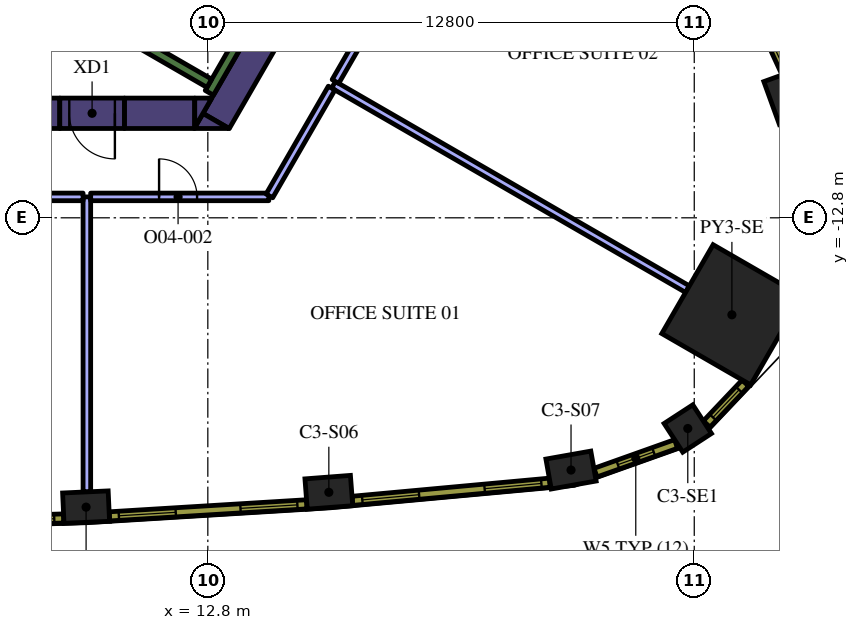
"""IFC4 building model, lengths in metres.
Left out: names, types, materials, properties, quantities, classifications, styles, units other than length and angle.
Written with IfcOpenShell. Run it as: python <this file> out.ifc"""

import sys

from ifc_helpers import new_model, si_unit, direction, frame, frame_2d, origin, origin_2d, place, context, subcontext, project, spatial, polyline, rectangle, outline, extrude, element, fill, save


model = new_model("IFC4")
c1 = context("Model", 3, precision=1e-05, world=origin(), true_north=direction((0.0, 1.0)))
c2 = subcontext(c1, "Body", "Model", "MODEL_VIEW")
j1 = project(units=[si_unit("LENGTHUNIT", "METRE"), si_unit("PLANEANGLEUNIT", "RADIAN")], contexts=[c1])
p1 = place(None, origin())
s1 = spatial("IfcSite", under=j1, at=p1, CompositionType="ELEMENT")
p2 = place(p1, origin())
s2 = spatial("IfcBuilding", under=s1, at=p2, CompositionType="ELEMENT")
p3 = place(p2, frame((0.0, 0.0, 187.8)))
s3 = spatial("IfcBuildingStorey", under=s2, at=p3, CompositionType="ELEMENT", Elevation=187.8)
p4 = place(p3, frame((26.591, -15.352, 0.0), z_axis=(0.0, 0.0, 1.0), x_axis=(0.866025403784, -0.5, 0.0)))
e1 = element("IfcColumn", 1, at=p4, inside=s3, PredefinedType="COLUMN", context=c2, shape_type="SweptSolid", body=[
    extrude(rectangle(XDim=2.7, YDim=2.7, at=origin_2d()), origin(), (0.0, 0.0, 1.0), 4.2),
])
for number, where, z_axis, x_axis in (
    (2, (9.597, -20.413, 0.0), (0.0, 0.0, 1.0), (0.999, 0.046, 0.0)),
    (3, (15.985, -20.022, 0.0), (0.0, 0.0, 1.0), (0.997, 0.076, 0.0)),
    (4, (22.357, -19.437, 0.0), (0.0, 0.0, 1.0), (0.985, 0.175, 0.0)),
):
    element("IfcColumn", number, at=place(p3, frame(where, z_axis=z_axis, x_axis=x_axis)), inside=s3, PredefinedType="COLUMN", context=c2, shape_type="SweptSolid", body=[
        extrude(rectangle(XDim=1.2, YDim=0.8, at=origin_2d()), origin(), (0.0, 0.0, 1.0), 4.2),
    ])
p5 = place(p3, frame((25.43, -18.344, 0.0), z_axis=(0.0, 0.0, 1.0), x_axis=(0.838094050847, 0.545525766518, 0.0)))
e5 = element("IfcColumn", 5, at=p5, inside=s3, PredefinedType="COLUMN", context=c2, shape_type="SweptSolid", body=[
    extrude(rectangle(XDim=0.9, YDim=0.9, at=origin_2d()), origin(), (0.0, 0.0, 1.0), 4.2),
])
p6 = place(p3, frame((28.012, -9.644, 0.0), z_axis=(0.0, 0.0, 1.0), x_axis=(-0.340743851601, 0.940156171918, 0.0)))
e6 = element("IfcColumn", 6, at=p6, inside=s3, PredefinedType="COLUMN", context=c2, shape_type="SweptSolid", body=[
    extrude(rectangle(XDim=1.2, YDim=0.8, at=origin_2d()), origin(), (0.0, 0.0, 1.0), 4.2),
])
p7 = place(p3, frame((13.018, -10.252, 0.0), z_axis=(0.0, 0.0, 1.0), x_axis=(0.499984020225, 0.866034629516, 0.0)))
e7 = element("IfcWall", 7, at=p7, inside=s3, PredefinedType="SOLIDWALL", context=c2, shape_type="SweptSolid", body=[
    extrude(rectangle(XDim=3.824, YDim=0.8, at=frame_2d((1.912, 0.0))), origin(), (0.0, 0.0, 1.0), 4.2),
])
p8 = place(p3, origin())
e8 = element("IfcWall", 8, at=p8, inside=s3, PredefinedType="SOLIDWALL", context=c2, shape_type="SweptSolid", body=[
    extrude(outline(polyline([(12.671, -10.053), (13.358, -10.45), (12.442, -10.45), (12.671, -10.053)])), origin(), (0.0, 0.0, 1.0), 4.2),
])
p9 = place(p3, frame((10.604, -10.05, 0.0), z_axis=(0.0, 0.0, 1.0), x_axis=(1.0, 0.0, 0.0)))
e9 = element("IfcWall", 9, at=p9, inside=s3, PredefinedType="SOLIDWALL", context=c2, shape_type="SweptSolid", body=[
    extrude(rectangle(XDim=1.849, YDim=0.8, at=frame_2d((0.925, 0.0))), origin(), (0.0, 0.0, 1.0), 4.2),
])
e10 = element("IfcWall", 10, at=p8, inside=s3, PredefinedType="SOLIDWALL", context=c2, shape_type="SweptSolid", body=[
    extrude(outline(polyline([(12.904, -9.65), (12.456, -10.426), (12.456, -9.65), (12.904, -9.65)])), origin(), (0.0, 0.0, 1.0), 4.2),
])
p10 = place(p3, frame((-13.378, -10.05, 0.0), z_axis=(0.0, 0.0, 1.0), x_axis=(1.0, 0.0, 0.0)))
e11 = element("IfcWall", 11, at=p10, inside=s3, PredefinedType="SOLIDWALL", context=c2, shape_type="SweptSolid", body=[
    extrude(rectangle(XDim=22.282, YDim=0.8, at=frame_2d((11.141, 0.0))), origin(), (0.0, 0.0, 1.0), 4.2),
])
p11 = place(p3, frame((12.84, -9.511, 0.0), z_axis=(0.0, 0.0, 1.0), x_axis=(0.499997733992, 0.866026712061, 0.0)))
e12 = element("IfcWall", 12, at=p11, inside=s3, PredefinedType="SOLIDWALL", context=c2, shape_type="SweptSolid", body=[
    extrude(rectangle(XDim=3.634, YDim=0.25, at=frame_2d((1.817, 0.0))), origin(), (0.0, 0.0, 1.0), 4.2),
])
p12 = place(p3, frame((12.84, -9.261, 0.0), z_axis=(0.0, 0.0, 1.0), x_axis=(-0.866013990052, 0.500019768644, 0.0)))
e13 = element("IfcWall", 13, at=p12, inside=s3, PredefinedType="SOLIDWALL", context=c2, shape_type="SweptSolid", body=[
    extrude(rectangle(XDim=6.8, YDim=0.25, at=frame_2d((3.4, 0.0))), origin(), (0.0, 0.0, 1.0), 4.2),
])
p13 = place(p3, frame((10.604, -10.05, 0.0), z_axis=(0.0, 0.0, 1.0), x_axis=(-1.0, 0.0, 0.0)))
e14 = element("IfcWall", 14, at=p13, inside=s3, PredefinedType="SOLIDWALL", context=c2, shape_type="SweptSolid", body=[
    extrude(rectangle(XDim=1.7, YDim=0.8, at=frame_2d((0.85, 0.0))), origin(), (0.0, 0.0, 1.0), 4.2),
])
p14 = place(p13, frame((0.25, 0.0, 0.0)))
e15 = element("IfcOpeningElement", 15, at=p14, cuts=e14, PredefinedType="OPENING", context=c2, shape_type="SweptSolid", body=[
    extrude(rectangle(XDim=1.2, YDim=2.1, at=frame_2d((0.6, 1.05))), frame((0.0, 0.41, 0.0), z_axis=(0.0, -1.0, 0.0), x_axis=(1.0, 0.0, 0.0)), (0.0, 0.0, 1.0), 0.82),
])
p15 = place(p3, frame((9.617, -12.25, 0.0), z_axis=(0.0, 0.0, 1.0), x_axis=(0.0, -1.0, 0.0)))
e16 = element("IfcWall", 16, at=p15, inside=s3, PredefinedType="PARTITIONING", context=c2, shape_type="SweptSolid", body=[
    extrude(rectangle(XDim=7.761, YDim=0.2, at=frame_2d((3.881, 0.0))), origin(), (0.0, 0.0, 1.0), 3.15),
])
p16 = place(p3, frame((3.53, -12.25, 0.0), z_axis=(0.0, 0.0, 1.0), x_axis=(1.0, 0.0, 0.0)))
e17 = element("IfcWall", 17, at=p16, inside=s3, PredefinedType="PARTITIONING", context=c2, shape_type="SweptSolid", body=[
    extrude(rectangle(XDim=5.987, YDim=0.2, at=frame_2d((2.994, 0.0))), origin(), (0.0, 0.0, 1.0), 3.15),
])
p17 = place(p3, frame((16.108, -9.3, 0.0), z_axis=(0.0, 0.0, 1.0), x_axis=(0.866027180319, -0.499996922939, 0.0)))
e18 = element("IfcWall", 18, at=p17, inside=s3, PredefinedType="PARTITIONING", context=c2, shape_type="SweptSolid", body=[
    extrude(rectangle(XDim=10.754, YDim=0.2, at=frame_2d((5.377, 0.0))), origin(), (0.0, 0.0, 1.0), 3.15),
])
p18 = place(p3, frame((9.717, -12.25, 0.0), z_axis=(0.0, 0.0, 1.0), x_axis=(1.0, 0.0, 0.0)))
e19 = element("IfcWall", 19, at=p18, inside=s3, PredefinedType="PARTITIONING", context=c2, shape_type="SweptSolid", body=[
    extrude(rectangle(XDim=4.688, YDim=0.2, at=frame_2d((2.344, 0.0))), origin(), (0.0, 0.0, 1.0), 3.15),
])
p19 = place(p18, frame((1.8, 0.0, 0.0)))
e20 = element("IfcOpeningElement", 20, at=p19, cuts=e19, PredefinedType="OPENING", context=c2, shape_type="SweptSolid", body=[
    extrude(rectangle(XDim=1.0, YDim=2.1, at=frame_2d((0.5, 1.05))), frame((0.0, 0.11, 0.0), z_axis=(0.0, -1.0, 0.0), x_axis=(1.0, 0.0, 0.0)), (0.0, 0.0, 1.0), 0.22),
])
p20 = place(p3, frame((14.42, -12.224, 0.0), z_axis=(0.0, 0.0, 1.0), x_axis=(0.500001965626, 0.866024268927, 0.0)))
e21 = element("IfcWall", 21, at=p20, inside=s3, PredefinedType="PARTITIONING", context=c2, shape_type="SweptSolid", body=[
    extrude(rectangle(XDim=3.276, YDim=0.2, at=frame_2d((1.638, 0.0))), origin(), (0.0, 0.0, 1.0), 3.15),
])
p21 = place(p3, frame((16.158, -9.213, 0.0), z_axis=(0.0, 0.0, 1.0), x_axis=(0.499990919662, 0.866030646256, 0.0)))
e22 = element("IfcWall", 22, at=p21, inside=s3, PredefinedType="PARTITIONING", context=c2, shape_type="SweptSolid", body=[
    extrude(rectangle(XDim=3.306, YDim=0.2, at=frame_2d((1.653, 0.0))), origin(), (0.0, 0.0, 1.0), 3.15),
])
p22 = place(p3, frame((3.806, -20.87, 0.0), z_axis=(0.0, 0.0, 1.0), x_axis=(0.999533441983, 0.030543384845, 0.0)))
e23 = element("IfcWall", 23, at=p22, inside=s3, PredefinedType="SOLIDWALL", context=c2, shape_type="SweptSolid", body=[
    extrude(rectangle(XDim=5.204, YDim=0.24, at=frame_2d((2.602, 0.0))), origin(), (0.0, 0.0, 1.0), 3.95),
])
p23 = place(p22, frame((0.248, 0.0, 0.9)))
e24 = element("IfcOpeningElement", 24, at=p23, cuts=e23, PredefinedType="OPENING", context=c2, shape_type="SweptSolid", body=[
    extrude(rectangle(XDim=1.5, YDim=2.55, at=frame_2d((0.75, 1.275))), frame((0.0, 0.13, 0.0), z_axis=(0.0, -1.0, 0.0), x_axis=(1.0, 0.0, 0.0)), (0.0, 0.0, 1.0), 0.26),
])
p24 = place(p22, frame((3.455, 0.0, 0.9)))
e25 = element("IfcOpeningElement", 25, at=p24, cuts=e23, PredefinedType="OPENING", context=c2, shape_type="SweptSolid", body=[
    extrude(rectangle(XDim=1.5, YDim=2.55, at=frame_2d((0.75, 1.275))), frame((0.0, 0.13, 0.0), z_axis=(0.0, -1.0, 0.0), x_axis=(1.0, 0.0, 0.0)), (0.0, 0.0, 1.0), 0.26),
])
p25 = place(p3, frame((10.211, -20.656, 0.0), z_axis=(0.0, 0.0, 1.0), x_axis=(0.998135294646, 0.061040425794, 0.0)))
e26 = element("IfcWall", 26, at=p25, inside=s3, PredefinedType="SOLIDWALL", context=c2, shape_type="SweptSolid", body=[
    extrude(rectangle(XDim=5.204, YDim=0.24, at=frame_2d((2.602, 0.0))), origin(), (0.0, 0.0, 1.0), 3.95),
])
p26 = place(p25, frame((0.248, 0.0, 0.9)))
e27 = element("IfcOpeningElement", 27, at=p26, cuts=e26, PredefinedType="OPENING", context=c2, shape_type="SweptSolid", body=[
    extrude(rectangle(XDim=1.5, YDim=2.55, at=frame_2d((0.75, 1.275))), frame((0.0, 0.13, 0.0), z_axis=(0.0, -1.0, 0.0), x_axis=(1.0, 0.0, 0.0)), (0.0, 0.0, 1.0), 0.26),
])
p27 = place(p25, frame((3.455, 0.0, 0.9)))
e28 = element("IfcOpeningElement", 28, at=p27, cuts=e26, PredefinedType="OPENING", context=c2, shape_type="SweptSolid", body=[
    extrude(rectangle(XDim=1.5, YDim=2.55, at=frame_2d((0.75, 1.275))), frame((0.0, 0.13, 0.0), z_axis=(0.0, -1.0, 0.0), x_axis=(1.0, 0.0, 0.0)), (0.0, 0.0, 1.0), 0.26),
])
p28 = place(p3, frame((16.606, -20.247, 0.0), z_axis=(0.0, 0.0, 1.0), x_axis=(0.995808712151, 0.091460422067, 0.0)))
e29 = element("IfcWall", 29, at=p28, inside=s3, PredefinedType="SOLIDWALL", context=c2, shape_type="SweptSolid", body=[
    extrude(rectangle(XDim=5.213, YDim=0.24, at=frame_2d((2.606, 0.0))), origin(), (0.0, 0.0, 1.0), 3.95),
])
p29 = place(p28, frame((0.261, 0.0, 0.9)))
e30 = element("IfcOpeningElement", 30, at=p29, cuts=e29, PredefinedType="OPENING", context=c2, shape_type="SweptSolid", body=[
    extrude(rectangle(XDim=1.5, YDim=2.55, at=frame_2d((0.75, 1.275))), frame((0.0, 0.13, 0.0), z_axis=(0.0, -1.0, 0.0), x_axis=(1.0, 0.0, 0.0)), (0.0, 0.0, 1.0), 0.26),
])
p30 = place(p28, frame((3.492, 0.0, 0.9)))
e31 = element("IfcOpeningElement", 31, at=p30, cuts=e29, PredefinedType="OPENING", context=c2, shape_type="SweptSolid", body=[
    extrude(rectangle(XDim=1.5, YDim=2.55, at=frame_2d((0.75, 1.275))), frame((0.0, 0.13, 0.0), z_axis=(0.0, -1.0, 0.0), x_axis=(1.0, 0.0, 0.0)), (0.0, 0.0, 1.0), 0.26),
])
p31 = place(p3, frame((23.001, -19.505, 0.0), z_axis=(0.0, 0.0, 1.0), x_axis=(0.942099727267, 0.335332825539, 0.0)))
e32 = element("IfcWall", 32, at=p31, inside=s3, PredefinedType="SOLIDWALL", context=c2, shape_type="SweptSolid", body=[
    extrude(rectangle(XDim=2.25, YDim=0.24, at=frame_2d((1.125, 0.0))), origin(), (0.0, 0.0, 1.0), 3.95),
])
p32 = place(p31, frame((0.625, 0.0, 0.9)))
e33 = element("IfcOpeningElement", 33, at=p32, cuts=e32, PredefinedType="OPENING", context=c2, shape_type="SweptSolid", body=[
    extrude(rectangle(XDim=1.0, YDim=2.55, at=frame_2d((0.5, 1.275))), frame((0.0, 0.13, 0.0), z_axis=(0.0, -1.0, 0.0), x_axis=(1.0, 0.0, 0.0)), (0.0, 0.0, 1.0), 0.26),
])
p33 = place(p3, frame((25.927, -18.226, 0.0), z_axis=(0.0, 0.0, 1.0), x_axis=(0.687986858937, 0.725723144133, 0.0)))
e34 = element("IfcWall", 34, at=p33, inside=s3, PredefinedType="SOLIDWALL", context=c2, shape_type="SweptSolid", body=[
    extrude(rectangle(XDim=1.481, YDim=0.24, at=frame_2d((0.741, 0.0))), origin(), (0.0, 0.0, 1.0), 3.95),
])
p34 = place(p33, frame((0.241, 0.0, 0.9)))
e35 = element("IfcOpeningElement", 35, at=p34, cuts=e34, PredefinedType="OPENING", context=c2, shape_type="SweptSolid", body=[
    extrude(rectangle(XDim=1.0, YDim=2.55, at=frame_2d((0.5, 1.275))), frame((0.0, 0.13, 0.0), z_axis=(0.0, -1.0, 0.0), x_axis=(1.0, 0.0, 0.0)), (0.0, 0.0, 1.0), 0.26),
])
p35 = place(p3, frame((28.02, -8.992, 0.0), z_axis=(0.0, 0.0, 1.0), x_axis=(-0.418722559465, 0.908114209885, 0.0)))
e36 = element("IfcWall", 36, at=p35, inside=s3, PredefinedType="SOLIDWALL", context=c2, shape_type="SweptSolid", body=[
    extrude(rectangle(XDim=5.213, YDim=0.24, at=frame_2d((2.606, 0.0))), origin(), (0.0, 0.0, 1.0), 3.95),
])
p36 = place(p35, frame((0.221, 0.0, 0.9)))
e37 = element("IfcOpeningElement", 37, at=p36, cuts=e36, PredefinedType="OPENING", context=c2, shape_type="SweptSolid", body=[
    extrude(rectangle(XDim=1.5, YDim=2.55, at=frame_2d((0.75, 1.275))), frame((0.0, 0.13, 0.0), z_axis=(0.0, -1.0, 0.0), x_axis=(1.0, 0.0, 0.0)), (0.0, 0.0, 1.0), 0.26),
])
p37 = place(p35, frame((3.452, 0.0, 0.9)))
e38 = element("IfcOpeningElement", 38, at=p37, cuts=e36, PredefinedType="OPENING", context=c2, shape_type="SweptSolid", body=[
    extrude(rectangle(XDim=1.5, YDim=2.55, at=frame_2d((0.75, 1.275))), frame((0.0, 0.13, 0.0), z_axis=(0.0, -1.0, 0.0), x_axis=(1.0, 0.0, 0.0)), (0.0, 0.0, 1.0), 0.26),
])
p38 = place(p14, origin())
e39 = element("IfcDoor", 39, at=p38, inside=s3, OperationType="SINGLE_SWING_LEFT", PredefinedType="DOOR", context=c2, shape_type="SweptSolid", body=[
    extrude(rectangle(XDim=1.2, YDim=2.1, at=frame_2d((0.6, 1.05))), frame((0.0, 0.025, 0.0), z_axis=(0.0, -1.0, 0.0), x_axis=(1.0, 0.0, 0.0)), (0.0, 0.0, 1.0), 0.05),
])
fill(e15, e39)
p39 = place(p19, origin())
e40 = element("IfcDoor", 40, at=p39, inside=s3, OperationType="SINGLE_SWING_LEFT", PredefinedType="DOOR", context=c2, shape_type="SweptSolid", body=[
    extrude(rectangle(XDim=1.0, YDim=2.1, at=frame_2d((0.5, 1.05))), frame((0.0, 0.025, 0.0), z_axis=(0.0, -1.0, 0.0), x_axis=(1.0, 0.0, 0.0)), (0.0, 0.0, 1.0), 0.05),
])
fill(e20, e40)
p40 = place(p24, origin())
e41 = element("IfcWindow", 41, at=p40, inside=s3, PartitioningType="SINGLE_PANEL", PredefinedType="WINDOW", context=c2, shape_type="SweptSolid", body=[
    extrude(rectangle(XDim=1.5, YDim=2.55, at=frame_2d((0.75, 1.275))), frame((0.0, 0.04, 0.0), z_axis=(0.0, -1.0, 0.0), x_axis=(1.0, 0.0, 0.0)), (0.0, 0.0, 1.0), 0.06),
])
fill(e25, e41)
p41 = place(p26, origin())
e42 = element("IfcWindow", 42, at=p41, inside=s3, PartitioningType="SINGLE_PANEL", PredefinedType="WINDOW", context=c2, shape_type="SweptSolid", body=[
    extrude(rectangle(XDim=1.5, YDim=2.55, at=frame_2d((0.75, 1.275))), frame((0.0, 0.04, 0.0), z_axis=(0.0, -1.0, 0.0), x_axis=(1.0, 0.0, 0.0)), (0.0, 0.0, 1.0), 0.06),
])
fill(e27, e42)
p42 = place(p27, origin())
e43 = element("IfcWindow", 43, at=p42, inside=s3, PartitioningType="SINGLE_PANEL", PredefinedType="WINDOW", context=c2, shape_type="SweptSolid", body=[
    extrude(rectangle(XDim=1.5, YDim=2.55, at=frame_2d((0.75, 1.275))), frame((0.0, 0.04, 0.0), z_axis=(0.0, -1.0, 0.0), x_axis=(1.0, 0.0, 0.0)), (0.0, 0.0, 1.0), 0.06),
])
fill(e28, e43)
p43 = place(p29, origin())
e44 = element("IfcWindow", 44, at=p43, inside=s3, PartitioningType="SINGLE_PANEL", PredefinedType="WINDOW", context=c2, shape_type="SweptSolid", body=[
    extrude(rectangle(XDim=1.5, YDim=2.55, at=frame_2d((0.75, 1.275))), frame((0.0, 0.04, 0.0), z_axis=(0.0, -1.0, 0.0), x_axis=(1.0, 0.0, 0.0)), (0.0, 0.0, 1.0), 0.06),
])
fill(e30, e44)
p44 = place(p30, origin())
e45 = element("IfcWindow", 45, at=p44, inside=s3, PartitioningType="SINGLE_PANEL", PredefinedType="WINDOW", context=c2, shape_type="SweptSolid", body=[
    extrude(rectangle(XDim=1.5, YDim=2.55, at=frame_2d((0.75, 1.275))), frame((0.0, 0.04, 0.0), z_axis=(0.0, -1.0, 0.0), x_axis=(1.0, 0.0, 0.0)), (0.0, 0.0, 1.0), 0.06),
])
fill(e31, e45)
p45 = place(p32, origin())
e46 = element("IfcWindow", 46, at=p45, inside=s3, PartitioningType="SINGLE_PANEL", PredefinedType="WINDOW", context=c2, shape_type="SweptSolid", body=[
    extrude(rectangle(XDim=1.0, YDim=2.55, at=frame_2d((0.5, 1.275))), frame((0.0, 0.04, 0.0), z_axis=(0.0, -1.0, 0.0), x_axis=(1.0, 0.0, 0.0)), (0.0, 0.0, 1.0), 0.06),
])
fill(e33, e46)
p46 = place(p34, origin())
e47 = element("IfcWindow", 47, at=p46, inside=s3, PartitioningType="SINGLE_PANEL", PredefinedType="WINDOW", context=c2, shape_type="SweptSolid", body=[
    extrude(rectangle(XDim=1.0, YDim=2.55, at=frame_2d((0.5, 1.275))), frame((0.0, 0.04, 0.0), z_axis=(0.0, -1.0, 0.0), x_axis=(1.0, 0.0, 0.0)), (0.0, 0.0, 1.0), 0.06),
])
fill(e35, e47)
p47 = place(p36, origin())
e48 = element("IfcWindow", 48, at=p47, inside=s3, PartitioningType="SINGLE_PANEL", PredefinedType="WINDOW", context=c2, shape_type="SweptSolid", body=[
    extrude(rectangle(XDim=1.5, YDim=2.55, at=frame_2d((0.75, 1.275))), frame((0.0, 0.04, 0.0), z_axis=(0.0, -1.0, 0.0), x_axis=(1.0, 0.0, 0.0)), (0.0, 0.0, 1.0), 0.06),
])
fill(e37, e48)
save(model, sys.argv[1])
